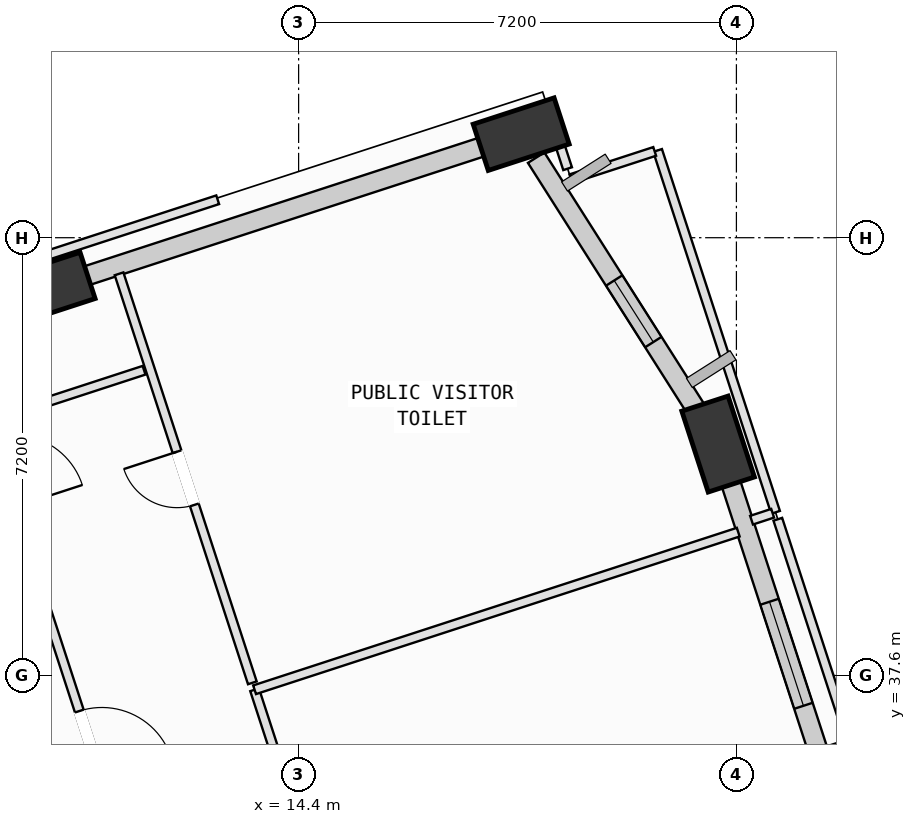
"""IFC4 building model, lengths in metres.
Left out: names, types, materials, properties, quantities, classifications, styles, units other than length and angle.
Written with IfcOpenShell. Run it as: python <this file> out.ifc"""

import sys

from ifc_helpers import new_model, si_unit, direction, frame, frame_2d, origin, origin_2d, place, context, subcontext, project, spatial, rectangle, extrude, element, fill, save


model = new_model("IFC4")
c1 = context("Model", 3, precision=1e-05, world=origin(), true_north=direction((0.0, 1.0)))
c2 = subcontext(c1, "Body", "Model", "MODEL_VIEW")
j1 = project(units=[si_unit("LENGTHUNIT", "METRE"), si_unit("PLANEANGLEUNIT", "RADIAN")], contexts=[c1])
p1 = place(None, origin())
s1 = spatial("IfcSite", under=j1, at=p1, CompositionType="ELEMENT")
p2 = place(p1, origin())
s2 = spatial("IfcBuilding", under=s1, at=p2, CompositionType="ELEMENT")
p3 = place(p2, frame((0.0, 0.0, 100.4)))
s3 = spatial("IfcBuildingStorey", under=s2, at=p3, CompositionType="ELEMENT", Elevation=100.4)
p4 = place(p3, frame((23.158, 35.701, 0.002), z_axis=(-0.044753257144, -0.043594794084, 0.998046411698), x_axis=(0.463530801187, 0.884087426993, 0.059402169856)))
e1 = element("IfcColumn", 1, at=p4, inside=s3, PredefinedType="COLUMN", context=c2, shape_type="SweptSolid", body=[
    extrude(rectangle(XDim=1.4, YDim=0.8, at=origin_2d()), origin(), (0.0, 0.0, 1.0), 4.004),
])
p5 = place(p3, frame((21.299, 41.406, 0.002), z_axis=(-0.068172279111, -0.051372681759, 0.996350032835), x_axis=(0.570080774616, 0.817570088713, 0.081160707584)))
e2 = element("IfcColumn", 2, at=p5, inside=s3, PredefinedType="COLUMN", context=c2, shape_type="SweptSolid", body=[
    extrude(rectangle(XDim=1.4, YDim=0.8, at=origin_2d()), origin(), (0.0, 0.0, 1.0), 4.011),
])
p6 = place(p3, frame((18.06, 46.503, 0.002), z_axis=(-0.088834375416, -0.064788980566, 0.993937041136), x_axis=(0.809077584875, -0.586713593939, 0.034067878425)))
e3 = element("IfcColumn", 3, at=p6, inside=s3, PredefinedType="COLUMN", context=c2, shape_type="SweptSolid", body=[
    extrude(rectangle(XDim=1.4, YDim=0.8, at=origin_2d()), origin(), (0.0, 0.0, 1.0), 4.021),
])
p7 = place(p3, frame((10.264, 43.962, 0.002), z_axis=(-0.078015566554, -0.096625340394, 0.992258592792), x_axis=(0.932899829968, -0.358074339032, 0.038479539664)))
e4 = element("IfcColumn", 4, at=p7, inside=s3, PredefinedType="COLUMN", context=c2, shape_type="SweptSolid", body=[
    extrude(rectangle(XDim=1.4, YDim=0.8, at=origin_2d()), origin(), (0.0, 0.0, 1.0), 4.028),
])
p8 = place(p3, frame((21.462, 40.907, 0.0), z_axis=(0.0, 0.0, 1.0), x_axis=(0.309864717436, -0.95078065656, 0.0)))
e5 = element("IfcWall", 5, at=p8, inside=s3, PredefinedType="SOLIDWALL", context=c2, shape_type="SweptSolid", body=[
    extrude(rectangle(XDim=5.047, YDim=0.32, at=frame_2d((2.524, 0.0))), origin(), (0.0, 0.0, 1.0), 3.165),
])
p9 = place(p8, frame((2.203, 0.0, 0.75)))
e6 = element("IfcOpeningElement", 6, at=p9, cuts=e5, PredefinedType="OPENING", context=c2, shape_type="SweptSolid", body=[
    extrude(rectangle(XDim=1.8, YDim=2.05, at=frame_2d((0.9, 1.025))), frame((0.0, 0.17, 0.0), z_axis=(0.0, -1.0, 0.0), x_axis=(1.0, 0.0, 0.0)), (0.0, 0.0, 1.0), 0.34),
])
p10 = place(p3, frame((18.306, 46.116, 0.0), z_axis=(0.0, 0.0, 1.0), x_axis=(0.536308601373, -0.844021968964, 0.0)))
e7 = element("IfcWall", 7, at=p10, inside=s3, PredefinedType="SOLIDWALL", context=c2, shape_type="SweptSolid", body=[
    extrude(rectangle(XDim=5.129, YDim=0.32, at=frame_2d((2.564, 0.0))), origin(), (0.0, 0.0, 1.0), 3.165),
])
p11 = place(p10, frame((2.393, 0.0, 0.75)))
e8 = element("IfcOpeningElement", 8, at=p11, cuts=e7, PredefinedType="OPENING", context=c2, shape_type="SweptSolid", body=[
    extrude(rectangle(XDim=1.2, YDim=1.75, at=frame_2d((0.6, 0.875))), frame((0.0, 0.17, 0.0), z_axis=(0.0, -1.0, 0.0), x_axis=(1.0, 0.0, 0.0)), (0.0, 0.0, 1.0), 0.34),
])
p12 = place(p3, frame((10.518, 44.045, 0.0), z_axis=(0.0, 0.0, 1.0), x_axis=(0.950785640176, 0.309849425422, 0.0)))
e9 = element("IfcWall", 9, at=p12, inside=s3, PredefinedType="SOLIDWALL", context=c2, shape_type="SweptSolid", body=[
    extrude(rectangle(XDim=7.231, YDim=0.32, at=frame_2d((3.615, 0.0))), origin(), (0.0, 0.0, 1.0), 3.165),
])
p13 = place(p3, frame((10.26, 38.65, 0.0), z_axis=(0.0, 0.0, 1.0), x_axis=(0.309891367779, -0.950771970651, 0.0)))
e10 = element("IfcWall", 10, at=p13, inside=s3, PredefinedType="PARTITIONING", context=c2, shape_type="SweptSolid", body=[
    extrude(rectangle(XDim=4.64, YDim=0.15, at=frame_2d((2.32, 0.0))), origin(), (0.0, 0.0, 1.0), 2.965),
])
p14 = place(p13, frame((1.72, 0.0, 0.0)))
e11 = element("IfcOpeningElement", 11, at=p14, cuts=e10, PredefinedType="OPENING", context=c2, shape_type="SweptSolid", body=[
    extrude(rectangle(XDim=1.2, YDim=2.15, at=frame_2d((0.6, 1.075))), frame((0.0, 0.085, 0.0), z_axis=(0.0, -1.0, 0.0), x_axis=(1.0, 0.0, 0.0)), (0.0, 0.0, 1.0), 0.17),
])
p15 = place(p3, frame((15.969, 30.329, 0.0), z_axis=(0.0, 0.0, 1.0), x_axis=(-0.309856581724, 0.950783307995, 0.0)))
e12 = element("IfcWall", 12, at=p15, inside=s3, PredefinedType="PARTITIONING", context=c2, shape_type="SweptSolid", body=[
    extrude(rectangle(XDim=7.4, YDim=0.15, at=frame_2d((3.7, 0.0))), origin(), (0.0, 0.0, 1.0), 3.78),
])
p16 = place(p15, frame((3.24, 0.0, 0.0)))
e13 = element("IfcOpeningElement", 13, at=p16, cuts=e12, PredefinedType="OPENING", context=c2, shape_type="SweptSolid", body=[
    extrude(rectangle(XDim=0.92, YDim=2.1, at=frame_2d((0.46, 1.05))), frame((0.0, 0.085, 0.0), z_axis=(0.0, -1.0, 0.0), x_axis=(1.0, 0.0, 0.0)), (0.0, 0.0, 1.0), 0.17),
])
p17 = place(p3, frame((13.676, 37.365, 0.0), z_axis=(0.0, 0.0, 1.0), x_axis=(0.950786483754, 0.309846836859, 0.0)))
e14 = element("IfcWall", 14, at=p17, inside=s3, PredefinedType="PARTITIONING", context=c2, shape_type="SweptSolid", body=[
    extrude(rectangle(XDim=8.365, YDim=0.15, at=frame_2d((4.183, 0.0))), origin(), (0.0, 0.0, 1.0), 3.78),
])
p18 = place(p3, frame((22.281, 40.169, 0.0), z_axis=(0.0, 0.0, 1.0), x_axis=(0.309856581724, -0.950783307995, 0.0)))
e15 = element("IfcWall", 15, at=p18, inside=s3, PredefinedType="PARTITIONING", context=c2, shape_type="SweptSolid", body=[
    extrude(rectangle(XDim=7.4, YDim=0.15, at=frame_2d((3.7, 0.0))), origin(), (0.0, 0.0, 1.0), 3.78),
])
p19 = place(p3, frame((20.304, 46.235, 0.0), z_axis=(0.0, 0.0, 1.0), x_axis=(0.309879596568, -0.950775807239, 0.0)))
e16 = element("IfcWall", 16, at=p19, inside=s3, PredefinedType="PARTITIONING", context=c2, shape_type="SweptSolid", body=[
    extrude(rectangle(XDim=6.26, YDim=0.15, at=frame_2d((3.13, 0.0))), origin(), (0.0, 0.0, 1.0), 3.78),
])
p20 = place(p3, frame((22.196, 40.268, 0.0), z_axis=(0.0, 0.0, 1.0), x_axis=(-0.950011920854, -0.312213629162, 0.0)))
e17 = element("IfcWall", 17, at=p20, inside=s3, PredefinedType="PARTITIONING", context=c2, shape_type="SweptSolid", body=[
    extrude(rectangle(XDim=0.365, YDim=0.15, at=frame_2d((0.183, 0.0))), origin(), (0.0, 0.0, 1.0), 3.78),
])
p21 = place(p3, frame((13.639, 37.479, 0.0), z_axis=(0.0, 0.0, 1.0), x_axis=(-0.309802259718, 0.950801009609, 0.0)))
e18 = element("IfcWall", 18, at=p21, inside=s3, PredefinedType="PARTITIONING", context=c2, shape_type="SweptSolid", body=[
    extrude(rectangle(XDim=7.075, YDim=0.15, at=frame_2d((3.538, 0.0))), origin(), (0.0, 0.0, 1.0), 3.78),
])
p22 = place(p21, frame((3.078, 0.0, 0.0)))
e19 = element("IfcOpeningElement", 19, at=p22, cuts=e18, PredefinedType="OPENING", context=c2, shape_type="SweptSolid", body=[
    extrude(rectangle(XDim=0.92, YDim=2.1, at=frame_2d((0.46, 1.05))), frame((0.0, 0.085, 0.0), z_axis=(0.0, -1.0, 0.0), x_axis=(1.0, 0.0, 0.0)), (0.0, 0.0, 1.0), 0.17),
])
p23 = place(p3, frame((17.334, 46.466, 0.0), z_axis=(0.0, 0.0, 1.0), x_axis=(0.950824715875, 0.309729494368, 0.0)))
e20 = element("IfcWall", 20, at=p23, inside=s3, PredefinedType="PARTITIONING", context=c2, shape_type="SweptSolid", body=[
    extrude(rectangle(XDim=1.252, YDim=0.15, at=frame_2d((0.626, 0.0))), origin(), (0.0, 0.0, 1.0), 3.165),
])
p24 = place(p3, frame((18.54, 46.806, 0.0), z_axis=(0.0, 0.0, 1.0), x_axis=(0.309983937788, -0.950741793714, 0.0)))
e21 = element("IfcWall", 21, at=p24, inside=s3, PredefinedType="PARTITIONING", context=c2, shape_type="SweptSolid", body=[
    extrude(rectangle(XDim=0.916, YDim=0.15, at=frame_2d((0.458, 0.0))), origin(), (0.0, 0.0, 1.0), 3.78),
])
p25 = place(p3, frame((18.878, 45.77, 0.0), z_axis=(0.0, 0.0, 1.0), x_axis=(0.950817221111, 0.309752501262, 0.0)))
e22 = element("IfcWall", 22, at=p25, inside=s3, PredefinedType="PARTITIONING", context=c2, shape_type="SweptSolid", body=[
    extrude(rectangle(XDim=1.449, YDim=0.15, at=frame_2d((0.725, 0.0))), origin(), (0.0, 0.0, 1.0), 3.78),
])
p26 = place(p3, frame((7.612, 43.645, 0.0), z_axis=(0.0, 0.0, 1.0), x_axis=(0.950751095858, 0.309955406027, 0.0)))
e23 = element("IfcWall", 23, at=p26, inside=s3, PredefinedType="PARTITIONING", context=c2, shape_type="SweptSolid", body=[
    extrude(rectangle(XDim=5.74, YDim=0.15, at=frame_2d((2.87, 0.0))), origin(), (0.0, 0.0, 1.0), 3.78),
])
p27 = place(p3, frame((11.858, 42.62, 0.0), z_axis=(0.0, 0.0, 1.0), x_axis=(-0.950767532303, -0.309904984664, 0.0)))
e24 = element("IfcWall", 24, at=p27, inside=s3, PredefinedType="PARTITIONING", context=c2, shape_type="SweptSolid", body=[
    extrude(rectangle(XDim=2.656, YDim=0.15, at=frame_2d((1.328, 0.0))), origin(), (0.0, 0.0, 1.0), 3.78),
])
p28 = place(p9, origin())
e25 = element("IfcWindow", 25, at=p28, inside=s3, PartitioningType="SINGLE_PANEL", PredefinedType="WINDOW", context=c2, shape_type="SweptSolid", body=[
    extrude(rectangle(XDim=1.8, YDim=2.05, at=frame_2d((0.9, 1.025))), frame((0.0, 0.03, 0.0), z_axis=(0.0, -1.0, 0.0), x_axis=(1.0, 0.0, 0.0)), (0.0, 0.0, 1.0), 0.06),
])
fill(e6, e25)
p29 = place(p11, origin())
e26 = element("IfcWindow", 26, at=p29, inside=s3, PartitioningType="SINGLE_PANEL", PredefinedType="WINDOW", context=c2, shape_type="SweptSolid", body=[
    extrude(rectangle(XDim=1.2, YDim=1.75, at=frame_2d((0.6, 0.875))), frame((0.0, 0.03, 0.0), z_axis=(0.0, -1.0, 0.0), x_axis=(1.0, 0.0, 0.0)), (0.0, 0.0, 1.0), 0.06),
])
fill(e8, e26)
p30 = place(p14, origin())
e27 = element("IfcDoor", 27, at=p30, inside=s3, OperationType="SINGLE_SWING_RIGHT", PredefinedType="DOOR", context=c2, shape_type="SweptSolid", body=[
    extrude(rectangle(XDim=1.2, YDim=2.15, at=frame_2d((0.6, 1.075))), frame((0.0, 0.025, 0.0), z_axis=(0.0, -1.0, 0.0), x_axis=(1.0, 0.0, 0.0)), (0.0, 0.0, 1.0), 0.05),
])
fill(e11, e27)
p31 = place(p22, origin())
e28 = element("IfcDoor", 28, at=p31, inside=s3, OperationType="SINGLE_SWING_RIGHT", PredefinedType="DOOR", context=c2, shape_type="SweptSolid", body=[
    extrude(rectangle(XDim=0.92, YDim=2.1, at=frame_2d((0.46, 1.05))), frame((0.0, 0.025, 0.0), z_axis=(0.0, -1.0, 0.0), x_axis=(1.0, 0.0, 0.0)), (0.0, 0.0, 1.0), 0.05),
])
fill(e19, e28)
save(model, sys.argv[1])
